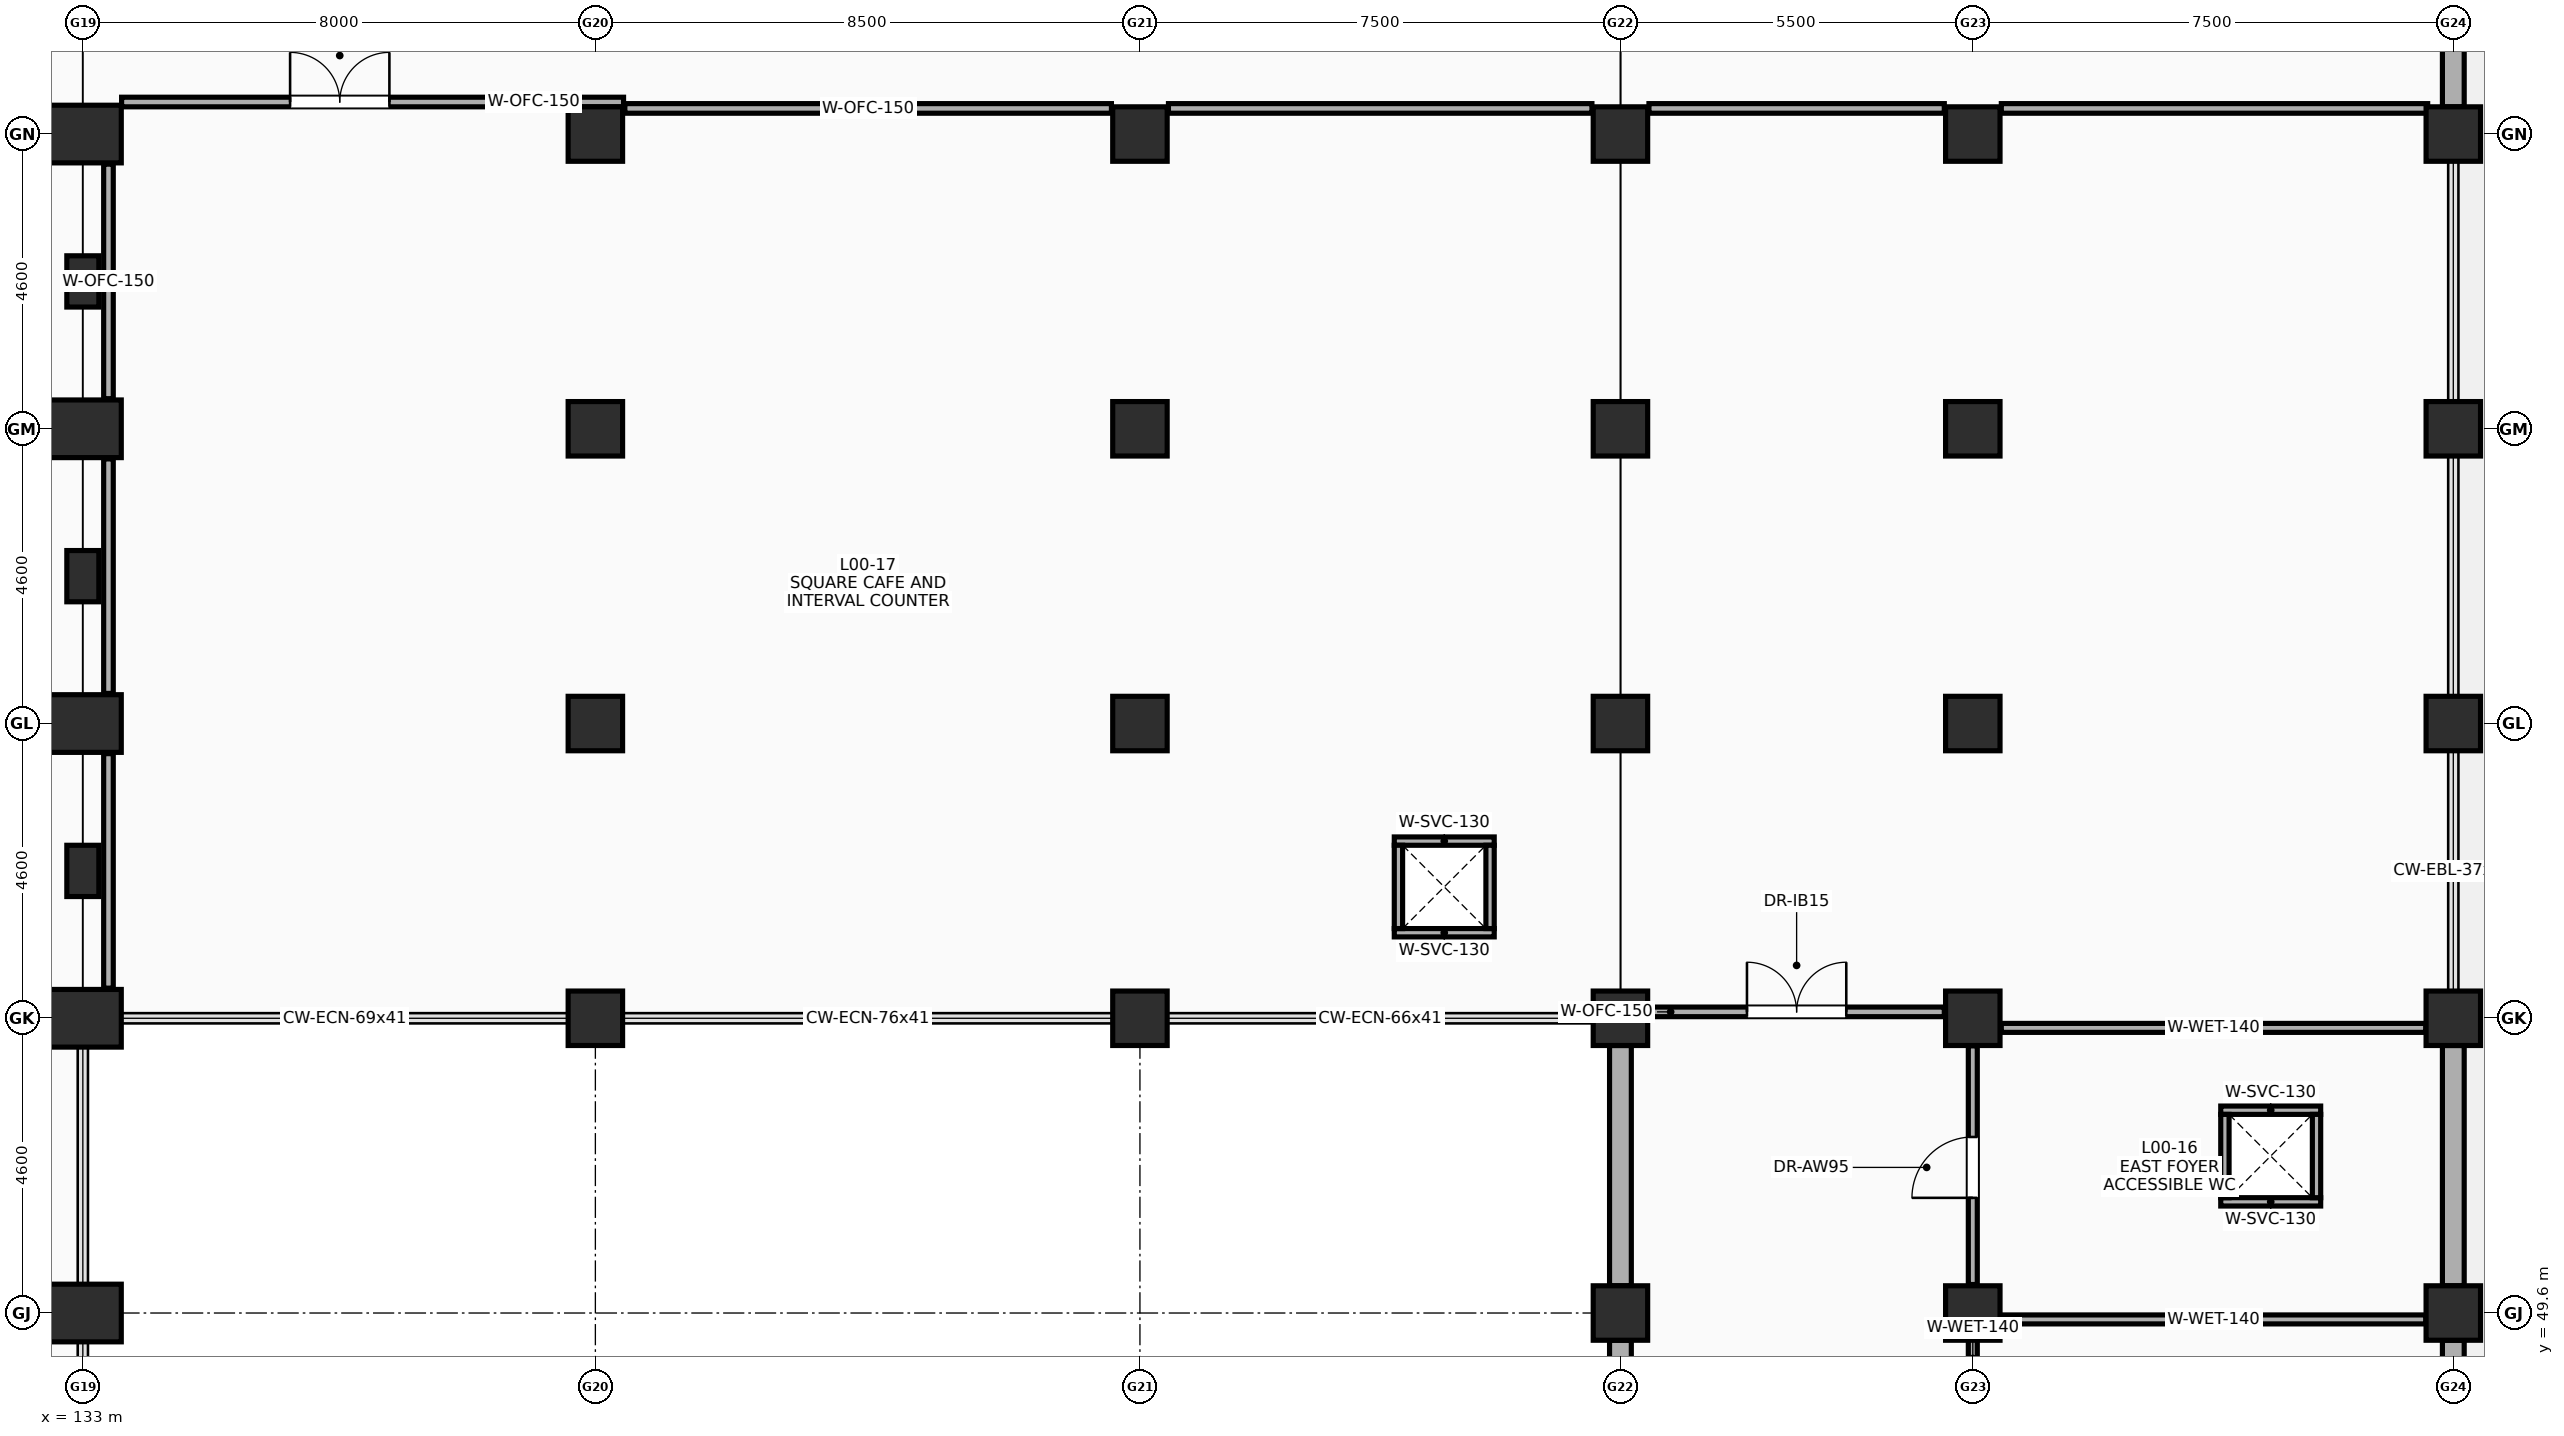
"""IFC4 building model, lengths in metres.
Left out: names, types, materials, properties, quantities, classifications, styles, units other than length and angle.
Written with IfcOpenShell. Run it as: python <this file> out.ifc"""

import sys

from ifc_helpers import new_model, si_unit, direction, frame, frame_2d, origin, origin_2d, place, context, subcontext, project, spatial, rectangle, extrude, element, fill, save


model = new_model("IFC4")
c1 = context("Model", 3, precision=1e-05, world=origin(), true_north=direction((0.0, 1.0)))
c2 = subcontext(c1, "Body", "Model", "MODEL_VIEW")
j1 = project(units=[si_unit("LENGTHUNIT", "METRE"), si_unit("PLANEANGLEUNIT", "RADIAN")], contexts=[c1])
p1 = place(None, origin())
s1 = spatial("IfcSite", under=j1, at=p1, CompositionType="ELEMENT")
p2 = place(p1, origin())
s2 = spatial("IfcBuilding", under=s1, at=p2, CompositionType="ELEMENT")
p3 = place(p2, origin())
s3 = spatial("IfcBuildingStorey", under=s2, at=p3, CompositionType="ELEMENT", Elevation=0.0)
for number, where, z_axis, x_axis in (
    (1, (133.0, 49.6, 0.0), (0.0, 0.0, 1.0), (1.0, 0.0, 0.0)),
    (2, (133.0, 54.2, 0.0), (0.0, 0.0, 1.0), (1.0, 0.0, 0.0)),
    (3, (133.0, 58.8, 0.0), (0.0, 0.0, 1.0), (1.0, 0.0, 0.0)),
    (4, (133.0, 63.4, 0.0), (0.0, 0.0, 1.0), (1.0, 0.0, 0.0)),
    (5, (133.0, 68.0, 0.0), (0.0, 0.0, 1.0), (1.0, 0.0, 0.0)),
):
    element("IfcColumn", number, at=place(p3, frame(where, z_axis=z_axis, x_axis=x_axis)), inside=s3, PredefinedType="COLUMN", context=c2, shape_type="SweptSolid", body=[
        extrude(rectangle(XDim=1.2, YDim=0.9, at=origin_2d()), origin(), (0.0, 0.0, 1.0), 5.4),
    ])
for number, where, z_axis, x_axis in (
    (6, (141.0, 54.2, 0.0), (0.0, 0.0, 1.0), (1.0, 0.0, 0.0)),
    (7, (141.0, 58.8, 0.0), (0.0, 0.0, 1.0), (1.0, 0.0, 0.0)),
    (8, (141.0, 63.4, 0.0), (0.0, 0.0, 1.0), (1.0, 0.0, 0.0)),
    (9, (141.0, 68.0, 0.0), (0.0, 0.0, 1.0), (1.0, 0.0, 0.0)),
    (10, (149.5, 54.2, 0.0), (0.0, 0.0, 1.0), (1.0, 0.0, 0.0)),
    (11, (149.5, 58.8, 0.0), (0.0, 0.0, 1.0), (1.0, 0.0, 0.0)),
    (12, (149.5, 63.4, 0.0), (0.0, 0.0, 1.0), (1.0, 0.0, 0.0)),
    (13, (149.5, 68.0, 0.0), (0.0, 0.0, 1.0), (1.0, 0.0, 0.0)),
    (14, (157.0, 49.6, 0.0), (0.0, 0.0, 1.0), (1.0, 0.0, 0.0)),
    (15, (157.0, 54.2, 0.0), (0.0, 0.0, 1.0), (1.0, 0.0, 0.0)),
    (16, (157.0, 58.8, 0.0), (0.0, 0.0, 1.0), (1.0, 0.0, 0.0)),
    (17, (157.0, 63.4, 0.0), (0.0, 0.0, 1.0), (1.0, 0.0, 0.0)),
    (18, (157.0, 68.0, 0.0), (0.0, 0.0, 1.0), (1.0, 0.0, 0.0)),
    (19, (162.5, 49.6, 0.0), (0.0, 0.0, 1.0), (1.0, 0.0, 0.0)),
    (20, (162.5, 54.2, 0.0), (0.0, 0.0, 1.0), (1.0, 0.0, 0.0)),
    (21, (162.5, 58.8, 0.0), (0.0, 0.0, 1.0), (1.0, 0.0, 0.0)),
    (22, (162.5, 63.4, 0.0), (0.0, 0.0, 1.0), (1.0, 0.0, 0.0)),
    (23, (162.5, 68.0, 0.0), (0.0, 0.0, 1.0), (1.0, 0.0, 0.0)),
    (24, (170.0, 49.6, 0.0), (0.0, 0.0, 1.0), (1.0, 0.0, 0.0)),
    (25, (170.0, 54.2, 0.0), (0.0, 0.0, 1.0), (1.0, 0.0, 0.0)),
    (26, (170.0, 58.8, 0.0), (0.0, 0.0, 1.0), (1.0, 0.0, 0.0)),
    (27, (170.0, 63.4, 0.0), (0.0, 0.0, 1.0), (1.0, 0.0, 0.0)),
    (28, (170.0, 68.0, 0.0), (0.0, 0.0, 1.0), (1.0, 0.0, 0.0)),
):
    element("IfcColumn", number, at=place(p3, frame(where, z_axis=z_axis, x_axis=x_axis)), inside=s3, PredefinedType="COLUMN", context=c2, shape_type="SweptSolid", body=[
        extrude(rectangle(XDim=0.85, YDim=0.85, at=origin_2d()), origin(), (0.0, 0.0, 1.0), 5.4),
    ])
for number, where, z_axis, x_axis in (
    (29, (133.0, 56.5, 0.0), (0.0, 0.0, 1.0), (1.0, 0.0, 0.0)),
    (30, (133.0, 61.1, 0.0), (0.0, 0.0, 1.0), (1.0, 0.0, 0.0)),
    (31, (133.0, 65.7, 0.0), (0.0, 0.0, 1.0), (1.0, 0.0, 0.0)),
):
    element("IfcColumn", number, at=place(p3, frame(where, z_axis=z_axis, x_axis=x_axis)), inside=s3, PredefinedType="PILASTER", context=c2, shape_type="SweptSolid", body=[
        extrude(rectangle(XDim=0.5, YDim=0.8, at=origin_2d()), origin(), (0.0, 0.0, 1.0), 5.4),
    ])
for number, where, z_axis, x_axis in (
    (32, (170.0, 45.425, 0.0), (0.0, 0.0, 1.0), (0.0, 1.0, 0.0)),
    (33, (170.0, 50.025, 0.0), (0.0, 0.0, 1.0), (0.0, 1.0, 0.0)),
    (34, (170.0, 68.425, 0.0), (0.0, 0.0, 1.0), (0.0, 1.0, 0.0)),
    (35, (157.0, 45.425, 0.0), (0.0, 0.0, 1.0), (0.0, 1.0, 0.0)),
    (36, (157.0, 50.025, 0.0), (0.0, 0.0, 1.0), (0.0, 1.0, 0.0)),
):
    element("IfcWall", number, at=place(p3, frame(where, z_axis=z_axis, x_axis=x_axis)), inside=s3, PredefinedType="SOLIDWALL", context=c2, shape_type="SweptSolid", body=[
        extrude(rectangle(XDim=3.75, YDim=0.34, at=frame_2d((1.875, 0.0))), origin(), (0.0, 0.0, 1.0), 4.15),
    ])
for number, where, z_axis, x_axis in (
    (37, (166.37, 51.335, 0.0), (0.0, 0.0, 1.0), (1.0, 0.0, 0.0)),
    (38, (166.37, 52.765, 0.0), (0.0, 0.0, 1.0), (1.0, 0.0, 0.0)),
):
    element("IfcWall", number, at=place(p3, frame(where, z_axis=z_axis, x_axis=x_axis)), inside=s3, PredefinedType="PARTITIONING", context=c2, shape_type="SweptSolid", body=[
        extrude(rectangle(XDim=1.56, YDim=0.13, at=frame_2d((0.78, 0.0))), origin(), (0.0, 0.0, 1.0), 5.1),
    ])
for number, where, z_axis, x_axis in (
    (39, (166.435, 51.4, 0.0), (0.0, 0.0, 1.0), (0.0, 1.0, 0.0)),
    (40, (167.865, 51.4, 0.0), (0.0, 0.0, 1.0), (0.0, 1.0, 0.0)),
):
    element("IfcWall", number, at=place(p3, frame(where, z_axis=z_axis, x_axis=x_axis)), inside=s3, PredefinedType="PARTITIONING", context=c2, shape_type="SweptSolid", body=[
        extrude(rectangle(XDim=1.3, YDim=0.13, at=frame_2d((0.65, 0.0))), origin(), (0.0, 0.0, 1.0), 5.1),
    ])
for number, where, z_axis, x_axis in (
    (41, (153.47, 55.535, 0.0), (0.0, 0.0, 1.0), (1.0, 0.0, 0.0)),
    (42, (153.47, 56.965, 0.0), (0.0, 0.0, 1.0), (1.0, 0.0, 0.0)),
):
    element("IfcWall", number, at=place(p3, frame(where, z_axis=z_axis, x_axis=x_axis)), inside=s3, PredefinedType="PARTITIONING", context=c2, shape_type="SweptSolid", body=[
        extrude(rectangle(XDim=1.56, YDim=0.13, at=frame_2d((0.78, 0.0))), origin(), (0.0, 0.0, 1.0), 5.1),
    ])
for number, where, z_axis, x_axis in (
    (43, (153.535, 55.6, 0.0), (0.0, 0.0, 1.0), (0.0, 1.0, 0.0)),
    (44, (154.965, 55.6, 0.0), (0.0, 0.0, 1.0), (0.0, 1.0, 0.0)),
):
    element("IfcWall", number, at=place(p3, frame(where, z_axis=z_axis, x_axis=x_axis)), inside=s3, PredefinedType="PARTITIONING", context=c2, shape_type="SweptSolid", body=[
        extrude(rectangle(XDim=1.3, YDim=0.13, at=frame_2d((0.65, 0.0))), origin(), (0.0, 0.0, 1.0), 5.1),
    ])
p4 = place(p3, frame((162.945, 49.5, 0.0), z_axis=(0.0, 0.0, 1.0), x_axis=(1.0, 0.0, 0.0)))
e45 = element("IfcWall", 45, at=p4, inside=s3, PredefinedType="PARTITIONING", context=c2, shape_type="SweptSolid", body=[
    extrude(rectangle(XDim=6.625, YDim=0.14, at=frame_2d((3.312, 0.0))), origin(), (0.0, 0.0, 1.0), 4.2),
])
p5 = place(p3, frame((162.5, 45.445, 0.0), z_axis=(0.0, 0.0, 1.0), x_axis=(0.0, 1.0, 0.0)))
e46 = element("IfcWall", 46, at=p5, inside=s3, PredefinedType="PARTITIONING", context=c2, shape_type="SweptSolid", body=[
    extrude(rectangle(XDim=3.755, YDim=0.14, at=frame_2d((1.877, 0.0))), origin(), (0.0, 0.0, 1.0), 4.4),
])
p6 = place(p5, frame((1.427, 0.0, 0.0)))
e47 = element("IfcOpeningElement", 47, at=p6, cuts=e46, PredefinedType="OPENING", context=c2, shape_type="SweptSolid", body=[
    extrude(rectangle(XDim=0.9, YDim=2.1, at=frame_2d((0.45, 1.05))), frame((0.0, 0.08, 0.0), z_axis=(0.0, -1.0, 0.0), x_axis=(1.0, 0.0, 0.0)), (0.0, 0.0, 1.0), 0.16),
])
p7 = place(p3, frame((162.945, 54.05, 0.0), z_axis=(0.0, 0.0, 1.0), x_axis=(1.0, 0.0, 0.0)))
e48 = element("IfcWall", 48, at=p7, inside=s3, PredefinedType="PARTITIONING", context=c2, shape_type="SweptSolid", body=[
    extrude(rectangle(XDim=6.625, YDim=0.14, at=frame_2d((3.312, 0.0))), origin(), (0.0, 0.0, 1.0), 4.2),
])
p8 = place(p3, frame((162.5, 50.045, 0.0), z_axis=(0.0, 0.0, 1.0), x_axis=(0.0, 1.0, 0.0)))
e49 = element("IfcWall", 49, at=p8, inside=s3, PredefinedType="PARTITIONING", context=c2, shape_type="SweptSolid", body=[
    extrude(rectangle(XDim=3.725, YDim=0.14, at=frame_2d((1.863, 0.0))), origin(), (0.0, 0.0, 1.0), 4.4),
])
p9 = place(p8, frame((1.353, 0.0, 0.0)))
e50 = element("IfcOpeningElement", 50, at=p9, cuts=e49, PredefinedType="OPENING", context=c2, shape_type="SweptSolid", body=[
    extrude(rectangle(XDim=0.95, YDim=2.1, at=frame_2d((0.475, 1.05))), frame((0.0, 0.08, 0.0), z_axis=(0.0, -1.0, 0.0), x_axis=(1.0, 0.0, 0.0)), (0.0, 0.0, 1.0), 0.16),
])
p10 = place(p3, frame((133.605, 68.5, 0.0), z_axis=(0.0, 0.0, 1.0), x_axis=(1.0, 0.0, 0.0)))
e51 = element("IfcWall", 51, at=p10, inside=s3, PredefinedType="PARTITIONING", context=c2, shape_type="SweptSolid", body=[
    extrude(rectangle(XDim=7.835, YDim=0.15, at=frame_2d((3.917, 0.0))), origin(), (0.0, 0.0, 1.0), 4.4),
])
p11 = place(p10, frame((2.63, 0.0, 0.0)))
e52 = element("IfcOpeningElement", 52, at=p11, cuts=e51, PredefinedType="OPENING", context=c2, shape_type="SweptSolid", body=[
    extrude(rectangle(XDim=1.55, YDim=2.25, at=frame_2d((0.775, 1.125))), frame((0.0, 0.085, 0.0), z_axis=(0.0, -1.0, 0.0), x_axis=(1.0, 0.0, 0.0)), (0.0, 0.0, 1.0), 0.17),
])
p12 = place(p3, frame((157.445, 54.3, 0.0), z_axis=(0.0, 0.0, 1.0), x_axis=(1.0, 0.0, 0.0)))
e53 = element("IfcWall", 53, at=p12, inside=s3, PredefinedType="PARTITIONING", context=c2, shape_type="SweptSolid", body=[
    extrude(rectangle(XDim=4.61, YDim=0.15, at=frame_2d((2.305, 0.0))), origin(), (0.0, 0.0, 1.0), 4.4),
])
p13 = place(p12, frame((1.53, 0.0, 0.0)))
e54 = element("IfcOpeningElement", 54, at=p13, cuts=e53, PredefinedType="OPENING", context=c2, shape_type="SweptSolid", body=[
    extrude(rectangle(XDim=1.55, YDim=2.25, at=frame_2d((0.775, 1.125))), frame((0.0, 0.085, 0.0), z_axis=(0.0, -1.0, 0.0), x_axis=(1.0, 0.0, 0.0)), (0.0, 0.0, 1.0), 0.17),
])
p14 = place(p3, frame((149.945, 68.4, 0.0), z_axis=(0.0, 0.0, 1.0), x_axis=(1.0, 0.0, 0.0)))
e55 = element("IfcWall", 55, at=p14, inside=s3, PredefinedType="PARTITIONING", context=c2, shape_type="SweptSolid", body=[
    extrude(rectangle(XDim=6.61, YDim=0.15, at=frame_2d((3.305, 0.0))), origin(), (0.0, 0.0, 1.0), 4.2),
])
p15 = place(p3, frame((157.445, 68.4, 0.0), z_axis=(0.0, 0.0, 1.0), x_axis=(1.0, 0.0, 0.0)))
e56 = element("IfcWall", 56, at=p15, inside=s3, PredefinedType="PARTITIONING", context=c2, shape_type="SweptSolid", body=[
    extrude(rectangle(XDim=4.61, YDim=0.15, at=frame_2d((2.305, 0.0))), origin(), (0.0, 0.0, 1.0), 5.1),
])
p16 = place(p3, frame((162.945, 68.4, 0.0), z_axis=(0.0, 0.0, 1.0), x_axis=(1.0, 0.0, 0.0)))
e57 = element("IfcWall", 57, at=p16, inside=s3, PredefinedType="PARTITIONING", context=c2, shape_type="SweptSolid", body=[
    extrude(rectangle(XDim=6.655, YDim=0.15, at=frame_2d((3.328, 0.0))), origin(), (0.0, 0.0, 1.0), 4.2),
])
p17 = place(p3, frame((133.4, 54.67, 0.0), z_axis=(0.0, 0.0, 1.0), x_axis=(0.0, 1.0, 0.0)))
e58 = element("IfcWall", 58, at=p17, inside=s3, PredefinedType="PARTITIONING", context=c2, shape_type="SweptSolid", body=[
    extrude(rectangle(XDim=3.66, YDim=0.15, at=frame_2d((1.83, 0.0))), origin(), (0.0, 0.0, 1.0), 5.1),
])
for number, where, z_axis, x_axis in (
    (59, (133.4, 59.27, 0.0), (0.0, 0.0, 1.0), (0.0, 1.0, 0.0)),
    (60, (133.4, 63.87, 0.0), (0.0, 0.0, 1.0), (0.0, 1.0, 0.0)),
):
    element("IfcWall", number, at=place(p3, frame(where, z_axis=z_axis, x_axis=x_axis)), inside=s3, PredefinedType="PARTITIONING", context=c2, shape_type="SweptSolid", body=[
        extrude(rectangle(XDim=3.66, YDim=0.15, at=frame_2d((1.83, 0.0))), origin(), (0.0, 0.0, 1.0), 5.1),
    ])
p18 = place(p3, frame((141.46, 68.4, 0.0), z_axis=(0.0, 0.0, 1.0), x_axis=(1.0, 0.0, 0.0)))
e61 = element("IfcWall", 61, at=p18, inside=s3, PredefinedType="PARTITIONING", context=c2, shape_type="SweptSolid", body=[
    extrude(rectangle(XDim=7.595, YDim=0.15, at=frame_2d((3.797, 0.0))), origin(), (0.0, 0.0, 1.0), 4.2),
])
p19 = place(p9, origin())
e62 = element("IfcDoor", 62, at=p19, inside=s3, OperationType="SINGLE_SWING_LEFT", PredefinedType="DOOR", context=c2, shape_type="SweptSolid", body=[
    extrude(rectangle(XDim=0.95, YDim=2.1, at=frame_2d((0.475, 1.05))), frame((0.0, 0.025, 0.0), z_axis=(0.0, -1.0, 0.0), x_axis=(1.0, 0.0, 0.0)), (0.0, 0.0, 1.0), 0.05),
])
fill(e50, e62)
p20 = place(p11, origin())
e63 = element("IfcDoor", 63, at=p20, inside=s3, OperationType="DOUBLE_DOOR_SINGLE_SWING", PredefinedType="DOOR", context=c2, shape_type="SweptSolid", body=[
    extrude(rectangle(XDim=1.55, YDim=2.25, at=frame_2d((0.775, 1.125))), frame((0.0, 0.025, 0.0), z_axis=(0.0, -1.0, 0.0), x_axis=(1.0, 0.0, 0.0)), (0.0, 0.0, 1.0), 0.05),
])
fill(e52, e63)
p21 = place(p13, origin())
e64 = element("IfcDoor", 64, at=p21, inside=s3, OperationType="DOUBLE_DOOR_SINGLE_SWING", PredefinedType="DOOR", context=c2, shape_type="SweptSolid", body=[
    extrude(rectangle(XDim=1.55, YDim=2.25, at=frame_2d((0.775, 1.125))), frame((0.0, 0.025, 0.0), z_axis=(0.0, -1.0, 0.0), x_axis=(1.0, 0.0, 0.0)), (0.0, 0.0, 1.0), 0.05),
])
fill(e54, e64)
save(model, sys.argv[1])
